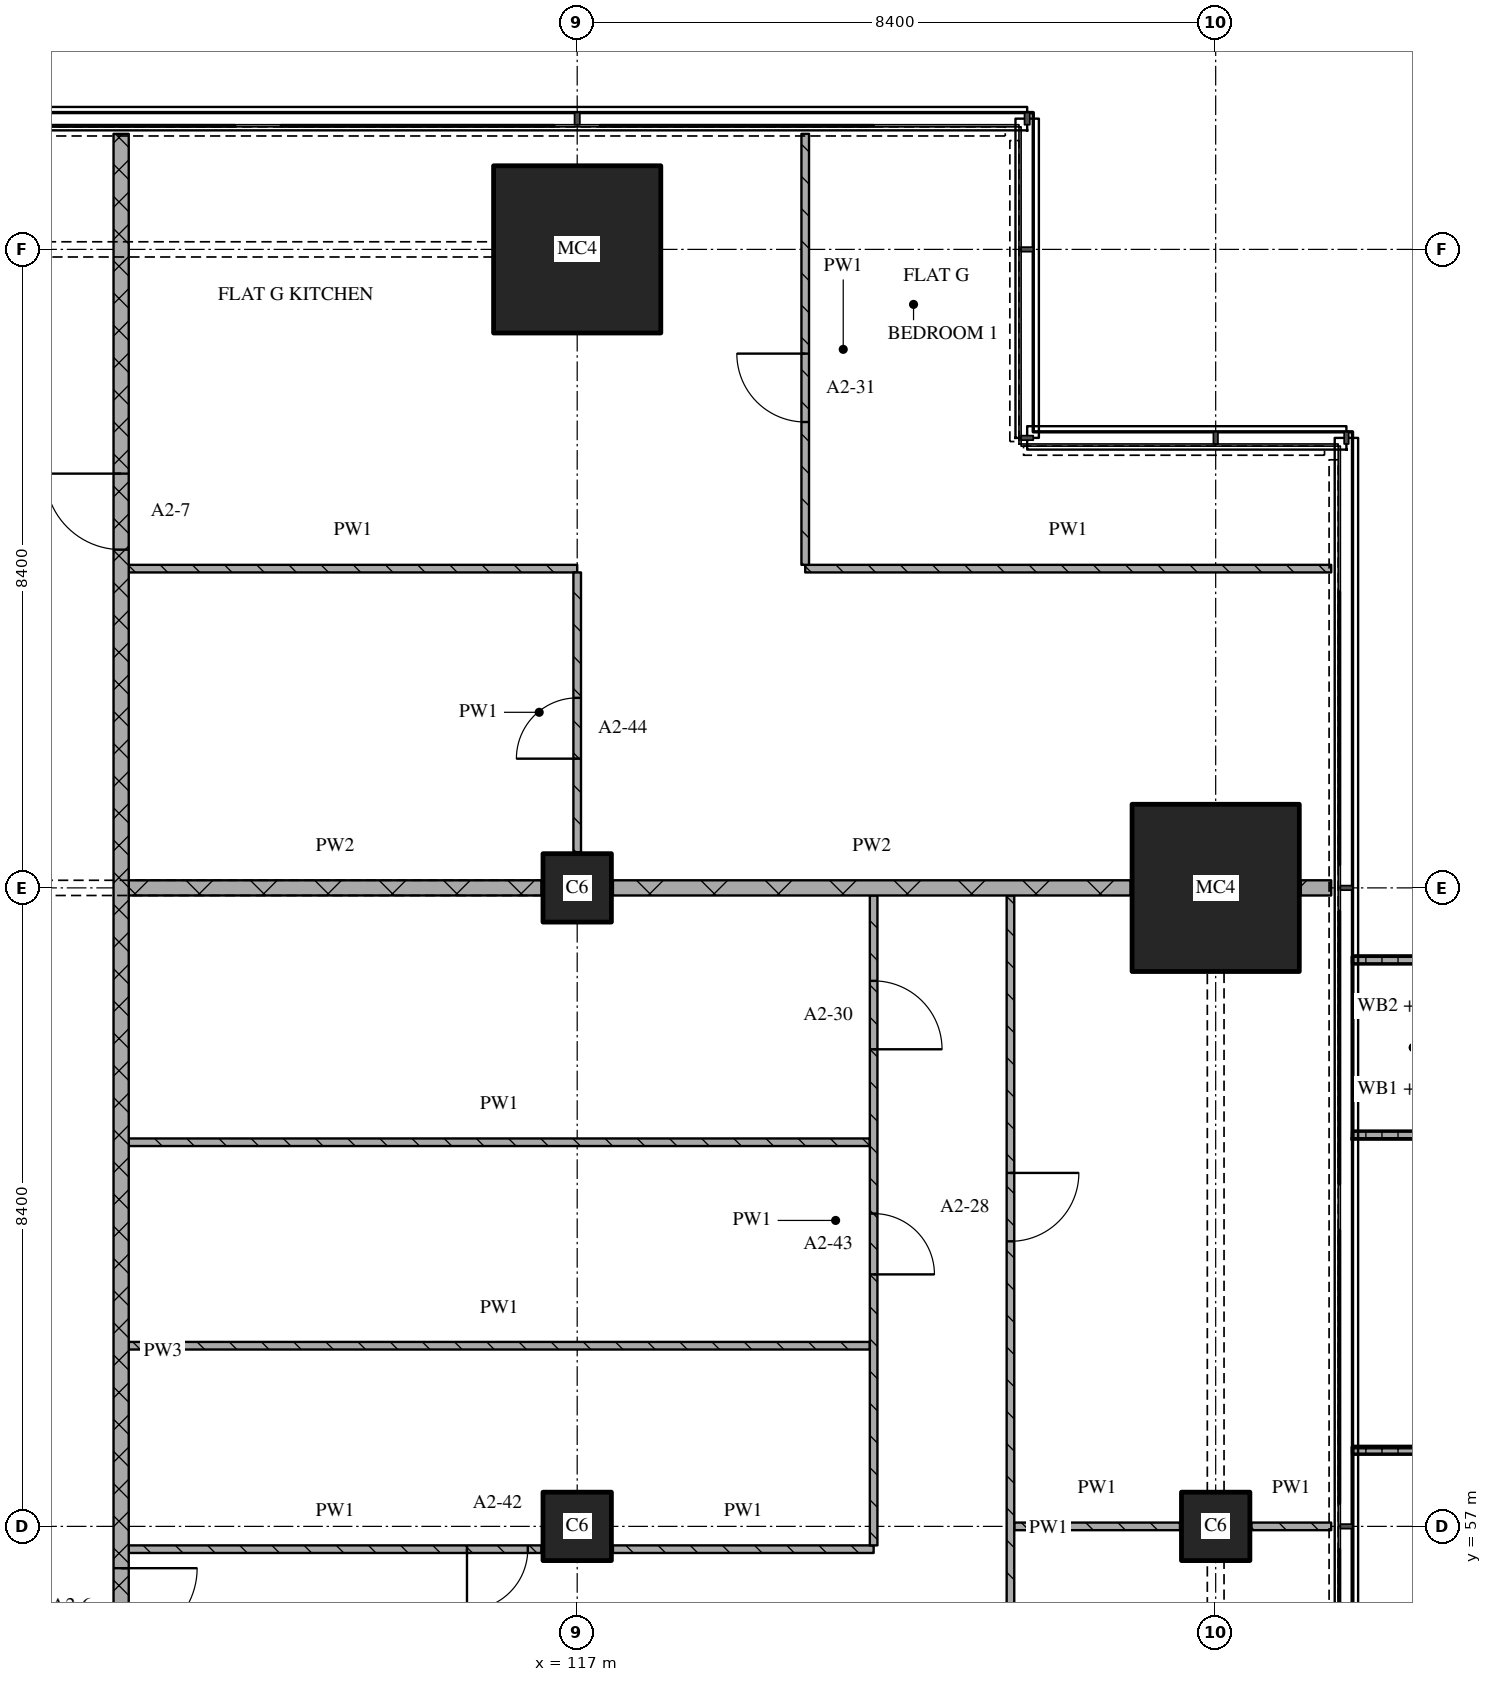
"""IFC4 building model, lengths in metres.
Left out: names, types, materials, properties, quantities, classifications, styles, units other than length and angle.
Written with IfcOpenShell. Run it as: python <this file> out.ifc"""

import sys

from ifc_helpers import new_model, si_unit, direction, frame, frame_2d, origin, origin_2d, place, context, subcontext, project, spatial, polyline, rectangle, outline, extrude, element, fill, save


model = new_model("IFC4")
c1 = context("Model", 3, precision=1e-05, world=origin(), true_north=direction((0.0, 1.0)))
c2 = subcontext(c1, "Body", "Model", "MODEL_VIEW")
j1 = project(units=[si_unit("LENGTHUNIT", "METRE"), si_unit("PLANEANGLEUNIT", "RADIAN")], contexts=[c1])
p1 = place(None, origin())
s1 = spatial("IfcSite", under=j1, at=p1, CompositionType="ELEMENT")
p2 = place(p1, origin())
s2 = spatial("IfcBuilding", under=s1, at=p2, CompositionType="ELEMENT")
p3 = place(p2, frame((0.0, 0.0, 48.0)))
s3 = spatial("IfcBuildingStorey", under=s2, at=p3, CompositionType="ELEMENT", Elevation=48.0)
for number, where, z_axis, x_axis in (
    (1, (117.0, 57.0, 0.0), (0.0, 0.0, 1.0), (1.0, 0.0, 0.0)),
    (2, (117.0, 65.4, 0.0), (0.0, 0.0, 1.0), (1.0, 0.0, 0.0)),
):
    element("IfcColumn", number, at=place(p3, frame(where, z_axis=z_axis, x_axis=x_axis)), inside=s3, PredefinedType="COLUMN", context=c2, shape_type="SweptSolid", body=[
        extrude(rectangle(XDim=0.9, YDim=0.9, at=origin_2d()), origin(), (0.0, 0.0, 1.0), 3.6),
    ])
p4 = place(p3, frame((117.0, 73.8, 0.0), z_axis=(0.0, 0.0, 1.0), x_axis=(1.0, 0.0, 0.0)))
e3 = element("IfcColumn", 3, at=p4, inside=s3, PredefinedType="COLUMN", context=c2, shape_type="SweptSolid", body=[
    extrude(rectangle(XDim=2.2, YDim=2.2, at=origin_2d()), origin(), (0.0, 0.0, 1.0), 3.6),
])
p5 = place(p3, frame((125.4, 57.0, 0.0), z_axis=(0.0, 0.0, 1.0), x_axis=(1.0, 0.0, 0.0)))
e4 = element("IfcColumn", 4, at=p5, inside=s3, PredefinedType="COLUMN", context=c2, shape_type="SweptSolid", body=[
    extrude(rectangle(XDim=0.9, YDim=0.9, at=origin_2d()), origin(), (0.0, 0.0, 1.0), 3.6),
])
p6 = place(p3, frame((125.4, 65.4, 0.0), z_axis=(0.0, 0.0, 1.0), x_axis=(1.0, 0.0, 0.0)))
e5 = element("IfcColumn", 5, at=p6, inside=s3, PredefinedType="COLUMN", context=c2, shape_type="SweptSolid", body=[
    extrude(rectangle(XDim=2.2, YDim=2.2, at=origin_2d()), origin(), (0.0, 0.0, 1.0), 3.6),
])
p7 = place(p3, origin())
e6 = element("IfcWall", 6, at=p7, inside=s3, PredefinedType="SOLIDWALL", context=c2, shape_type="SweptSolid", body=[
    extrude(outline(polyline([(127.2, 51.75), (127.2, 51.85), (128.967, 51.85), (128.967, 57.95), (127.2, 57.95), (127.2, 58.05), (129.067, 58.05), (129.067, 51.75), (127.2, 51.75)])), origin(), (0.0, 0.0, 1.0), 1.0),
])
p8 = place(p3, origin())
e7 = element("IfcWall", 7, at=p8, inside=s3, PredefinedType="SOLIDWALL", context=c2, shape_type="SweptSolid", body=[
    extrude(outline(polyline([(127.2, 62.1), (127.2, 62.2), (128.7, 62.2), (128.7, 64.4), (127.2, 64.4), (127.2, 64.5), (128.8, 64.5), (128.8, 62.1), (127.2, 62.1)])), origin(), (0.0, 0.0, 1.0), 1.0),
])
p9 = place(p3, frame((111.1, 56.7, 0.0), z_axis=(0.0, 0.0, 1.0), x_axis=(1.0, 0.0, 0.0)))
e8 = element("IfcWall", 8, at=p9, inside=s3, PredefinedType="PARTITIONING", context=c2, shape_type="SweptSolid", body=[
    extrude(rectangle(XDim=5.43, YDim=0.1, at=frame_2d((2.715, 0.0))), origin(), (0.0, 0.0, 1.0), 3.32),
])
p10 = place(p9, frame((4.45, 0.0, 0.0)))
e9 = element("IfcOpeningElement", 9, at=p10, cuts=e8, PredefinedType="OPENING", context=c2, shape_type="SweptSolid", body=[
    extrude(rectangle(XDim=0.8, YDim=2.1, at=frame_2d((0.4, 1.05))), frame((0.0, 0.06, 0.0), z_axis=(0.0, -1.0, 0.0), x_axis=(1.0, 0.0, 0.0)), (0.0, 0.0, 1.0), 0.12),
])
p11 = place(p3, frame((117.47, 56.7, 0.0), z_axis=(0.0, 0.0, 1.0), x_axis=(1.0, 0.0, 0.0)))
e10 = element("IfcWall", 10, at=p11, inside=s3, PredefinedType="PARTITIONING", context=c2, shape_type="SweptSolid", body=[
    extrude(rectangle(XDim=3.43, YDim=0.1, at=frame_2d((1.715, 0.0))), origin(), (0.0, 0.0, 1.0), 3.32),
])
p12 = place(p3, frame((122.75, 57.0, 0.0), z_axis=(0.0, 0.0, 1.0), x_axis=(1.0, 0.0, 0.0)))
e11 = element("IfcWall", 11, at=p12, inside=s3, PredefinedType="PARTITIONING", context=c2, shape_type="SweptSolid", body=[
    extrude(rectangle(XDim=2.18, YDim=0.1, at=frame_2d((1.09, 0.0))), origin(), (0.0, 0.0, 1.0), 3.32),
])
p13 = place(p3, frame((125.87, 57.0, 0.0), z_axis=(0.0, 0.0, 1.0), x_axis=(1.0, 0.0, 0.0)))
e12 = element("IfcWall", 12, at=p13, inside=s3, PredefinedType="PARTITIONING", context=c2, shape_type="SweptSolid", body=[
    extrude(rectangle(XDim=1.05, YDim=0.1, at=frame_2d((0.525, 0.0))), origin(), (0.0, 0.0, 1.0), 3.32),
])
for number, where, z_axis, x_axis in (
    (13, (111.1, 59.377, 0.0), (0.0, 0.0, 1.0), (1.0, 0.0, 0.0)),
    (14, (111.1, 62.053, 0.0), (0.0, 0.0, 1.0), (1.0, 0.0, 0.0)),
):
    element("IfcWall", number, at=place(p3, frame(where, z_axis=z_axis, x_axis=x_axis)), inside=s3, PredefinedType="PARTITIONING", context=c2, shape_type="SweptSolid", body=[
        extrude(rectangle(XDim=9.75, YDim=0.1, at=frame_2d((4.875, 0.0))), origin(), (0.0, 0.0, 1.0), 3.32),
    ])
p14 = place(p3, frame((111.1, 65.4, 0.0), z_axis=(0.0, 0.0, 1.0), x_axis=(1.0, 0.0, 0.0)))
e15 = element("IfcWall", 15, at=p14, inside=s3, PredefinedType="PARTITIONING", context=c2, shape_type="SweptSolid", body=[
    extrude(rectangle(XDim=5.43, YDim=0.2, at=frame_2d((2.715, 0.0))), origin(), (0.0, 0.0, 1.0), 2.82),
])
p15 = place(p3, frame((117.47, 65.4, 0.0), z_axis=(0.0, 0.0, 1.0), x_axis=(1.0, 0.0, 0.0)))
e16 = element("IfcWall", 16, at=p15, inside=s3, PredefinedType="PARTITIONING", context=c2, shape_type="SweptSolid", body=[
    extrude(rectangle(XDim=6.81, YDim=0.2, at=frame_2d((3.405, 0.0))), origin(), (0.0, 0.0, 1.0), 3.32),
])
p16 = place(p3, frame((126.52, 65.4, 0.0), z_axis=(0.0, 0.0, 1.0), x_axis=(1.0, 0.0, 0.0)))
e17 = element("IfcWall", 17, at=p16, inside=s3, PredefinedType="PARTITIONING", context=c2, shape_type="SweptSolid", body=[
    extrude(rectangle(XDim=0.4, YDim=0.2, at=frame_2d((0.2, 0.0))), origin(), (0.0, 0.0, 1.0), 3.32),
])
p17 = place(p3, frame((111.1, 69.6, 0.0), z_axis=(0.0, 0.0, 1.0), x_axis=(1.0, 0.0, 0.0)))
e18 = element("IfcWall", 18, at=p17, inside=s3, PredefinedType="PARTITIONING", context=c2, shape_type="SweptSolid", body=[
    extrude(rectangle(XDim=5.9, YDim=0.1, at=frame_2d((2.95, 0.0))), origin(), (0.0, 0.0, 1.0), 3.32),
])
p18 = place(p3, frame((120.0, 69.6, 0.0), z_axis=(0.0, 0.0, 1.0), x_axis=(1.0, 0.0, 0.0)))
e19 = element("IfcWall", 19, at=p18, inside=s3, PredefinedType="PARTITIONING", context=c2, shape_type="SweptSolid", body=[
    extrude(rectangle(XDim=6.92, YDim=0.1, at=frame_2d((3.46, 0.0))), origin(), (0.0, 0.0, 1.0), 3.32),
])
p19 = place(p3, frame((111.0, 75.32, 0.0), z_axis=(0.0, 0.0, 1.0), x_axis=(0.0, -1.0, 0.0)))
e20 = element("IfcWall", 20, at=p19, inside=s3, PredefinedType="PARTITIONING", context=c2, shape_type="SweptSolid", body=[
    extrude(rectangle(XDim=32.02, YDim=0.2, at=frame_2d((16.01, 0.0))), origin(), (0.0, 0.0, 1.0), 3.32),
])
p20 = place(p19, frame((4.47, 0.0, 0.0)))
e21 = element("IfcOpeningElement", 21, at=p20, cuts=e20, PredefinedType="OPENING", context=c2, shape_type="SweptSolid", body=[
    extrude(rectangle(XDim=1.0, YDim=2.1, at=frame_2d((0.5, 1.05))), frame((0.0, 0.11, 0.0), z_axis=(0.0, -1.0, 0.0), x_axis=(1.0, 0.0, 0.0)), (0.0, 0.0, 1.0), 0.22),
])
p21 = place(p19, frame((18.87, 0.0, 0.0)))
e22 = element("IfcOpeningElement", 22, at=p21, cuts=e20, PredefinedType="OPENING", context=c2, shape_type="SweptSolid", body=[
    extrude(rectangle(XDim=1.0, YDim=2.1, at=frame_2d((0.5, 1.05))), frame((0.0, 0.11, 0.0), z_axis=(0.0, -1.0, 0.0), x_axis=(1.0, 0.0, 0.0)), (0.0, 0.0, 1.0), 0.22),
])
p22 = place(p3, frame((117.0, 65.87, 0.0), z_axis=(0.0, 0.0, 1.0), x_axis=(0.0, 1.0, 0.0)))
e23 = element("IfcWall", 23, at=p22, inside=s3, PredefinedType="PARTITIONING", context=c2, shape_type="SweptSolid", body=[
    extrude(rectangle(XDim=3.68, YDim=0.1, at=frame_2d((1.84, 0.0))), origin(), (0.0, 0.0, 1.0), 3.32),
])
p23 = place(p22, frame((1.23, 0.0, 0.0)))
e24 = element("IfcOpeningElement", 24, at=p23, cuts=e23, PredefinedType="OPENING", context=c2, shape_type="SweptSolid", body=[
    extrude(rectangle(XDim=0.8, YDim=2.1, at=frame_2d((0.4, 1.05))), frame((0.0, 0.06, 0.0), z_axis=(0.0, -1.0, 0.0), x_axis=(1.0, 0.0, 0.0)), (0.0, 0.0, 1.0), 0.12),
])
p24 = place(p3, frame((120.0, 75.32, 0.0), z_axis=(0.0, 0.0, 1.0), x_axis=(0.0, -1.0, 0.0)))
e25 = element("IfcWall", 25, at=p24, inside=s3, PredefinedType="PARTITIONING", context=c2, shape_type="SweptSolid", body=[
    extrude(rectangle(XDim=5.67, YDim=0.1, at=frame_2d((2.835, 0.0))), origin(), (0.0, 0.0, 1.0), 3.32),
])
p25 = place(p24, frame((2.891, 0.0, 0.0)))
e26 = element("IfcOpeningElement", 26, at=p25, cuts=e25, PredefinedType="OPENING", context=c2, shape_type="SweptSolid", body=[
    extrude(rectangle(XDim=0.9, YDim=2.1, at=frame_2d((0.45, 1.05))), frame((0.0, 0.06, 0.0), z_axis=(0.0, -1.0, 0.0), x_axis=(1.0, 0.0, 0.0)), (0.0, 0.0, 1.0), 0.12),
])
p26 = place(p3, frame((120.9, 56.75, 0.0), z_axis=(0.0, 0.0, 1.0), x_axis=(0.0, 1.0, 0.0)))
e27 = element("IfcWall", 27, at=p26, inside=s3, PredefinedType="PARTITIONING", context=c2, shape_type="SweptSolid", body=[
    extrude(rectangle(XDim=8.55, YDim=0.1, at=frame_2d((4.275, 0.0))), origin(), (0.0, 0.0, 1.0), 3.32),
])
p27 = place(p26, frame((3.565, 0.0, 0.0)))
e28 = element("IfcOpeningElement", 28, at=p27, cuts=e27, PredefinedType="OPENING", context=c2, shape_type="SweptSolid", body=[
    extrude(rectangle(XDim=0.8, YDim=2.1, at=frame_2d((0.4, 1.05))), frame((0.0, 0.06, 0.0), z_axis=(0.0, -1.0, 0.0), x_axis=(1.0, 0.0, 0.0)), (0.0, 0.0, 1.0), 0.12),
])
p28 = place(p26, frame((6.527, 0.0, 0.0)))
e29 = element("IfcOpeningElement", 29, at=p28, cuts=e27, PredefinedType="OPENING", context=c2, shape_type="SweptSolid", body=[
    extrude(rectangle(XDim=0.9, YDim=2.1, at=frame_2d((0.45, 1.05))), frame((0.0, 0.06, 0.0), z_axis=(0.0, -1.0, 0.0), x_axis=(1.0, 0.0, 0.0)), (0.0, 0.0, 1.0), 0.12),
])
p29 = place(p3, frame((122.7, 65.3, 0.0), z_axis=(0.0, 0.0, 1.0), x_axis=(0.0, -1.0, 0.0)))
e30 = element("IfcWall", 30, at=p29, inside=s3, PredefinedType="PARTITIONING", context=c2, shape_type="SweptSolid", body=[
    extrude(rectangle(XDim=16.65, YDim=0.1, at=frame_2d((8.325, 0.0))), origin(), (0.0, 0.0, 1.0), 3.32),
])
p30 = place(p29, frame((3.65, 0.0, 0.0)))
e31 = element("IfcOpeningElement", 31, at=p30, cuts=e30, PredefinedType="OPENING", context=c2, shape_type="SweptSolid", body=[
    extrude(rectangle(XDim=0.9, YDim=2.1, at=frame_2d((0.45, 1.05))), frame((0.0, 0.06, 0.0), z_axis=(0.0, -1.0, 0.0), x_axis=(1.0, 0.0, 0.0)), (0.0, 0.0, 1.0), 0.12),
])
p31 = place(p29, frame((12.05, 0.0, 0.0)))
e32 = element("IfcOpeningElement", 32, at=p31, cuts=e30, PredefinedType="OPENING", context=c2, shape_type="SweptSolid", body=[
    extrude(rectangle(XDim=0.9, YDim=2.1, at=frame_2d((0.45, 1.05))), frame((0.0, 0.06, 0.0), z_axis=(0.0, -1.0, 0.0), x_axis=(1.0, 0.0, 0.0)), (0.0, 0.0, 1.0), 0.12),
])
p32 = place(p10, origin())
e33 = element("IfcDoor", 33, at=p32, inside=s3, OperationType="SINGLE_SWING_RIGHT", PredefinedType="DOOR", context=c2, shape_type="SweptSolid", body=[
    extrude(rectangle(XDim=0.8, YDim=2.1, at=frame_2d((0.4, 1.05))), frame((0.0, 0.025, 0.0), z_axis=(0.0, -1.0, 0.0), x_axis=(1.0, 0.0, 0.0)), (0.0, 0.0, 1.0), 0.05),
])
fill(e9, e33)
p33 = place(p20, origin())
e34 = element("IfcDoor", 34, at=p33, inside=s3, OperationType="SINGLE_SWING_RIGHT", PredefinedType="DOOR", context=c2, shape_type="SweptSolid", body=[
    extrude(rectangle(XDim=1.0, YDim=2.1, at=frame_2d((0.5, 1.05))), frame((0.0, 0.025, 0.0), z_axis=(0.0, -1.0, 0.0), x_axis=(1.0, 0.0, 0.0)), (0.0, 0.0, 1.0), 0.05),
])
fill(e21, e34)
p34 = place(p21, origin())
e35 = element("IfcDoor", 35, at=p34, inside=s3, OperationType="SINGLE_SWING_LEFT", PredefinedType="DOOR", context=c2, shape_type="SweptSolid", body=[
    extrude(rectangle(XDim=1.0, YDim=2.1, at=frame_2d((0.5, 1.05))), frame((0.0, 0.025, 0.0), z_axis=(0.0, -1.0, 0.0), x_axis=(1.0, 0.0, 0.0)), (0.0, 0.0, 1.0), 0.05),
])
fill(e22, e35)
p35 = place(p23, origin())
e36 = element("IfcDoor", 36, at=p35, inside=s3, OperationType="SINGLE_SWING_LEFT", PredefinedType="DOOR", context=c2, shape_type="SweptSolid", body=[
    extrude(rectangle(XDim=0.8, YDim=2.1, at=frame_2d((0.4, 1.05))), frame((0.0, 0.025, 0.0), z_axis=(0.0, -1.0, 0.0), x_axis=(1.0, 0.0, 0.0)), (0.0, 0.0, 1.0), 0.05),
])
fill(e24, e36)
p36 = place(p25, origin())
e37 = element("IfcDoor", 37, at=p36, inside=s3, OperationType="SINGLE_SWING_RIGHT", PredefinedType="DOOR", context=c2, shape_type="SweptSolid", body=[
    extrude(rectangle(XDim=0.9, YDim=2.1, at=frame_2d((0.45, 1.05))), frame((0.0, 0.025, 0.0), z_axis=(0.0, -1.0, 0.0), x_axis=(1.0, 0.0, 0.0)), (0.0, 0.0, 1.0), 0.05),
])
fill(e26, e37)
p37 = place(p27, origin())
e38 = element("IfcDoor", 38, at=p37, inside=s3, OperationType="SINGLE_SWING_RIGHT", PredefinedType="DOOR", context=c2, shape_type="SweptSolid", body=[
    extrude(rectangle(XDim=0.8, YDim=2.1, at=frame_2d((0.4, 1.05))), frame((0.0, 0.025, 0.0), z_axis=(0.0, -1.0, 0.0), x_axis=(1.0, 0.0, 0.0)), (0.0, 0.0, 1.0), 0.05),
])
fill(e28, e38)
p38 = place(p28, origin())
e39 = element("IfcDoor", 39, at=p38, inside=s3, OperationType="SINGLE_SWING_RIGHT", PredefinedType="DOOR", context=c2, shape_type="SweptSolid", body=[
    extrude(rectangle(XDim=0.9, YDim=2.1, at=frame_2d((0.45, 1.05))), frame((0.0, 0.025, 0.0), z_axis=(0.0, -1.0, 0.0), x_axis=(1.0, 0.0, 0.0)), (0.0, 0.0, 1.0), 0.05),
])
fill(e29, e39)
p39 = place(p30, origin())
e40 = element("IfcDoor", 40, at=p39, inside=s3, OperationType="SINGLE_SWING_LEFT", PredefinedType="DOOR", context=c2, shape_type="SweptSolid", body=[
    extrude(rectangle(XDim=0.9, YDim=2.1, at=frame_2d((0.45, 1.05))), frame((0.0, 0.025, 0.0), z_axis=(0.0, -1.0, 0.0), x_axis=(1.0, 0.0, 0.0)), (0.0, 0.0, 1.0), 0.05),
])
fill(e31, e40)
save(model, sys.argv[1])
